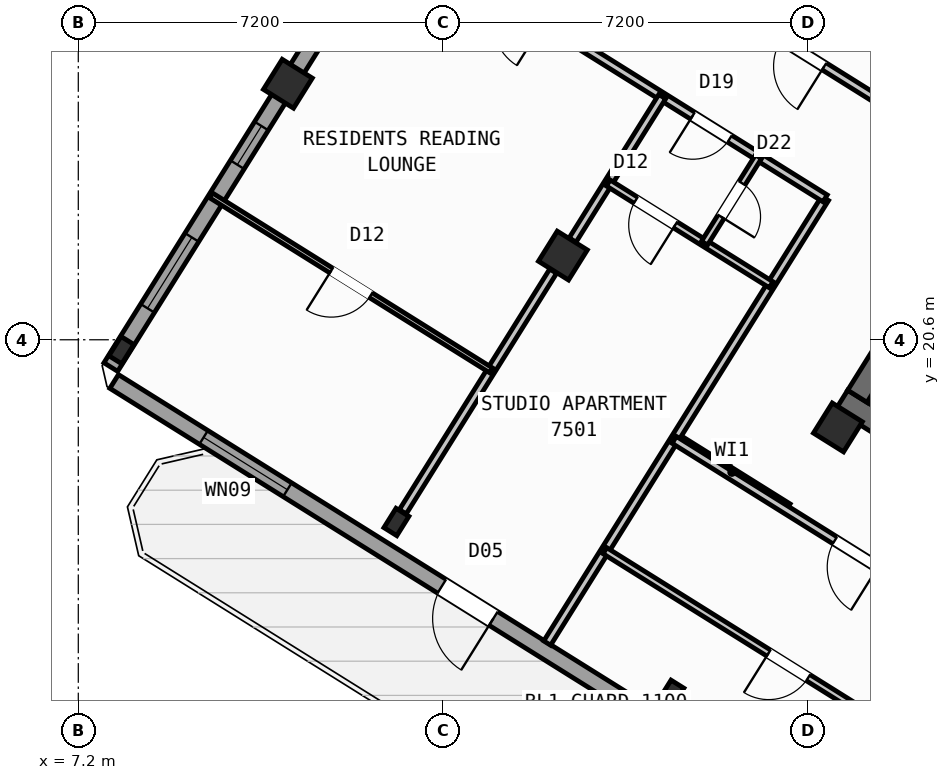
"""IFC4 building model, lengths in metres.
Left out: names, types, materials, properties, quantities, classifications, styles, units other than length and angle.
Written with IfcOpenShell. Run it as: python <this file> out.ifc"""

import sys

from ifc_helpers import new_model, si_unit, direction, frame, frame_2d, origin, origin_2d, place, context, subcontext, project, spatial, rectangle, hollow_rectangle, i_section, extrude, source, transform, mapped, element, fill, save


model = new_model("IFC4")
c1 = context("Model", 3, precision=1e-05, world=origin(), true_north=direction((0.0, 1.0)))
c2 = subcontext(c1, "Body", "Model", "MODEL_VIEW")
j1 = project(units=[si_unit("LENGTHUNIT", "METRE"), si_unit("PLANEANGLEUNIT", "RADIAN")], contexts=[c1])
p1 = place(None, origin())
s1 = spatial("IfcSite", under=j1, at=p1, CompositionType="ELEMENT")
p2 = place(p1, origin())
s2 = spatial("IfcBuilding", under=s1, at=p2, CompositionType="ELEMENT")
p3 = place(p2, frame((0.0, 0.0, 295.2)))
s3 = spatial("IfcBuildingStorey", under=s2, at=p3, CompositionType="ELEMENT", Elevation=295.2)
p4 = place(p3, frame((33.324, 12.503, 0.0), z_axis=(0.0, 0.0, 1.0), x_axis=(-0.848043529849, 0.529926571782, 0.0)))
e1 = element("IfcWall", 1, at=p4, inside=s3, PredefinedType="SHEAR", context=c2, shape_type="SweptSolid", body=[
    extrude(rectangle(XDim=13.04, YDim=0.45, at=frame_2d((6.52, 0.0))), origin(), (0.0, 0.0, 1.0), 3.32),
])
p5 = place(p3, frame((26.007, 24.976, 0.0), z_axis=(0.0, 0.0, 1.0), x_axis=(-0.529931155655, -0.848040665456, 0.0)))
e2 = element("IfcWall", 2, at=p5, inside=s3, PredefinedType="SHEAR", context=c2, shape_type="SweptSolid", body=[
    extrude(rectangle(XDim=6.475, YDim=0.45, at=frame_2d((3.238, 0.0))), origin(), (0.0, 0.0, 1.0), 3.32),
])
m1 = source(origin(), c2, "Body", "SweptSolid", [
    extrude(hollow_rectangle(XDim=0.7, YDim=0.7, WallThickness=0.028, at=origin_2d()), origin(), (0.0, 0.0, 1.0), 3.6),
])
p6 = place(p3, frame((22.191, 18.87, 0.0), z_axis=(0.0, 0.0, 1.0), x_axis=(-0.848048096156, 0.529919264233, 0.0)))
e3 = element("IfcColumn", 3, at=p6, inside=s3, PredefinedType="COLUMN", context=c2, shape_type="MappedRepresentation", body=[
    mapped(m1, transform((0.0, 0.0, 0.0), scale=1.0)),
])
m2 = source(origin(), c2, "Body", "SweptSolid", [
    extrude(i_section(OverallWidth=0.3, OverallDepth=0.45, WebThickness=0.014, FlangeThickness=0.026, at=origin_2d()), origin(), (0.0, 0.0, 1.0), 3.6),
])
p7 = place(p3, frame((18.906, 13.612, 0.0), z_axis=(0.0, 0.0, 1.0), x_axis=(-0.848048096156, 0.529919264233, 0.0)))
e4 = element("IfcColumn", 4, at=p7, inside=s3, PredefinedType="COLUMN", context=c2, shape_type="MappedRepresentation", body=[
    mapped(m2, transform((0.0, 0.0, 0.0), scale=1.0)),
])
p8 = place(p3, frame((16.764, 22.261, 0.0), z_axis=(0.0, 0.0, 1.0), x_axis=(-0.848048096156, 0.529919264233, 0.0)))
e5 = element("IfcColumn", 5, at=p8, inside=s3, PredefinedType="COLUMN", context=c2, shape_type="MappedRepresentation", body=[
    mapped(m1, transform((0.0, 0.0, 0.0), scale=1.0)),
])
p9 = place(p3, frame((13.478, 17.003, 0.0), z_axis=(0.0, 0.0, 1.0), x_axis=(-0.848048096156, 0.529919264233, 0.0)))
e6 = element("IfcColumn", 6, at=p9, inside=s3, PredefinedType="COLUMN", context=c2, shape_type="MappedRepresentation", body=[
    mapped(m2, transform((0.0, 0.0, 0.0), scale=1.0)),
])
p10 = place(p3, frame((11.336, 25.653, 0.0), z_axis=(0.0, 0.0, 1.0), x_axis=(-0.848048096156, 0.529919264233, 0.0)))
e7 = element("IfcColumn", 7, at=p10, inside=s3, PredefinedType="COLUMN", context=c2, shape_type="MappedRepresentation", body=[
    mapped(m1, transform((0.0, 0.0, 0.0), scale=1.0)),
])
p11 = place(p3, frame((8.051, 20.395, 0.0), z_axis=(0.0, 0.0, 1.0), x_axis=(-0.848048096156, 0.529919264233, 0.0)))
e8 = element("IfcColumn", 8, at=p11, inside=s3, PredefinedType="COLUMN", context=c2, shape_type="MappedRepresentation", body=[
    mapped(m2, transform((0.0, 0.0, 0.0), scale=1.0)),
])
p12 = place(p3, frame((29.268, 6.429, 0.0), z_axis=(0.0, 0.0, 1.0), x_axis=(-0.848048398186, 0.529918780885, 0.0)))
e9 = element("IfcWall", 9, at=p12, inside=s3, PredefinedType="STANDARD", context=c2, shape_type="SweptSolid", body=[
    extrude(rectangle(XDim=25.188, YDim=0.32, at=frame_2d((12.594, 0.0))), origin(), (0.0, 0.0, 1.0), 3.32),
])
p13 = place(p12, frame((16.362, 0.0, 0.0)))
e10 = element("IfcOpeningElement", 10, at=p13, cuts=e9, PredefinedType="OPENING", context=c2, shape_type="SweptSolid", body=[
    extrude(rectangle(XDim=1.2, YDim=2.15, at=frame_2d((0.6, 1.075))), frame((0.0, 0.17, 0.0), z_axis=(0.0, -1.0, 0.0), x_axis=(1.0, 0.0, 0.0)), (0.0, 0.0, 1.0), 0.34),
])
p14 = place(p12, frame((3.859, 0.0, 0.9)))
e11 = element("IfcOpeningElement", 11, at=p14, cuts=e9, PredefinedType="OPENING", context=c2, shape_type="SweptSolid", body=[
    extrude(rectangle(XDim=1.65, YDim=1.45, at=frame_2d((0.825, 0.725))), frame((0.0, 0.17, 0.0), z_axis=(0.0, -1.0, 0.0), x_axis=(1.0, 0.0, 0.0)), (0.0, 0.0, 1.0), 0.34),
])
p15 = place(p12, frame((10.519, 0.0, 0.9)))
e12 = element("IfcOpeningElement", 12, at=p15, cuts=e9, PredefinedType="OPENING", context=c2, shape_type="SweptSolid", body=[
    extrude(rectangle(XDim=1.65, YDim=1.45, at=frame_2d((0.825, 0.725))), frame((0.0, 0.17, 0.0), z_axis=(0.0, -1.0, 0.0), x_axis=(1.0, 0.0, 0.0)), (0.0, 0.0, 1.0), 0.34),
])
p16 = place(p12, frame((21.156, 0.0, 0.95)))
e13 = element("IfcOpeningElement", 13, at=p16, cuts=e9, PredefinedType="OPENING", context=c2, shape_type="SweptSolid", body=[
    extrude(rectangle(XDim=1.95, YDim=1.35, at=frame_2d((0.975, 0.675))), frame((0.0, 0.17, 0.0), z_axis=(0.0, -1.0, 0.0), x_axis=(1.0, 0.0, 0.0)), (0.0, 0.0, 1.0), 0.34),
])
p17 = place(p3, frame((7.842, 20.061, 0.0), z_axis=(0.0, 0.0, 1.0), x_axis=(0.529915577903, 0.84805039962, 0.0)))
e14 = element("IfcWall", 14, at=p17, inside=s3, PredefinedType="STANDARD", context=c2, shape_type="SweptSolid", body=[
    extrude(rectangle(XDim=21.587, YDim=0.32, at=frame_2d((10.794, 0.0))), origin(), (0.0, 0.0, 1.0), 3.32),
])
p18 = place(p17, frame((1.368, 0.0, 0.9)))
e15 = element("IfcOpeningElement", 15, at=p18, cuts=e14, PredefinedType="OPENING", context=c2, shape_type="SweptSolid", body=[
    extrude(rectangle(XDim=1.65, YDim=1.45, at=frame_2d((0.825, 0.725))), frame((0.0, 0.17, 0.0), z_axis=(0.0, -1.0, 0.0), x_axis=(1.0, 0.0, 0.0)), (0.0, 0.0, 1.0), 0.34),
])
p19 = place(p17, frame((4.71, 0.0, 1.0)))
e16 = element("IfcOpeningElement", 16, at=p19, cuts=e14, PredefinedType="OPENING", context=c2, shape_type="SweptSolid", body=[
    extrude(rectangle(XDim=0.9, YDim=1.25, at=frame_2d((0.45, 0.625))), frame((0.0, 0.17, 0.0), z_axis=(0.0, -1.0, 0.0), x_axis=(1.0, 0.0, 0.0)), (0.0, 0.0, 1.0), 0.34),
])
p20 = place(p17, frame((7.554, 0.0, 0.95)))
e17 = element("IfcOpeningElement", 17, at=p20, cuts=e14, PredefinedType="OPENING", context=c2, shape_type="SweptSolid", body=[
    extrude(rectangle(XDim=1.95, YDim=1.35, at=frame_2d((0.975, 0.675))), frame((0.0, 0.17, 0.0), z_axis=(0.0, -1.0, 0.0), x_axis=(1.0, 0.0, 0.0)), (0.0, 0.0, 1.0), 0.34),
])
p21 = place(p17, frame((16.744, 0.0, 1.0)))
e18 = element("IfcOpeningElement", 18, at=p21, cuts=e14, PredefinedType="OPENING", context=c2, shape_type="SweptSolid", body=[
    extrude(rectangle(XDim=0.9, YDim=1.25, at=frame_2d((0.45, 0.625))), frame((0.0, 0.17, 0.0), z_axis=(0.0, -1.0, 0.0), x_axis=(1.0, 0.0, 0.0)), (0.0, 0.0, 1.0), 0.34),
])
p22 = place(p17, frame((18.944, 0.0, 1.0)))
e19 = element("IfcOpeningElement", 19, at=p22, cuts=e14, PredefinedType="OPENING", context=c2, shape_type="SweptSolid", body=[
    extrude(rectangle(XDim=0.9, YDim=1.25, at=frame_2d((0.45, 0.625))), frame((0.0, 0.17, 0.0), z_axis=(0.0, -1.0, 0.0), x_axis=(1.0, 0.0, 0.0)), (0.0, 0.0, 1.0), 0.34),
])
p23 = place(p3, frame((19.566, 38.434, 0.0), z_axis=(0.0, 0.0, 1.0), x_axis=(0.84804567626, -0.529923136858, 0.0)))
e20 = element("IfcWall", 20, at=p23, inside=s3, PredefinedType="STANDARD", context=c2, shape_type="SweptSolid", body=[
    extrude(rectangle(XDim=25.188, YDim=0.32, at=frame_2d((12.594, 0.0))), origin(), (0.0, 0.0, 1.0), 3.32),
])
p24 = place(p23, frame((3.55, 0.0, 0.0)))
e21 = element("IfcOpeningElement", 21, at=p24, cuts=e20, PredefinedType="OPENING", context=c2, shape_type="SweptSolid", body=[
    extrude(rectangle(XDim=1.05, YDim=2.15, at=frame_2d((0.525, 1.075))), frame((0.0, 0.17, 0.0), z_axis=(0.0, -1.0, 0.0), x_axis=(1.0, 0.0, 0.0)), (0.0, 0.0, 1.0), 0.34),
])
p25 = place(p23, frame((7.349, 0.0, 0.9)))
e22 = element("IfcOpeningElement", 22, at=p25, cuts=e20, PredefinedType="OPENING", context=c2, shape_type="SweptSolid", body=[
    extrude(rectangle(XDim=1.65, YDim=1.45, at=frame_2d((0.825, 0.725))), frame((0.0, 0.17, 0.0), z_axis=(0.0, -1.0, 0.0), x_axis=(1.0, 0.0, 0.0)), (0.0, 0.0, 1.0), 0.34),
])
p26 = place(p23, frame((10.754, 0.0, 1.0)))
e23 = element("IfcOpeningElement", 23, at=p26, cuts=e20, PredefinedType="OPENING", context=c2, shape_type="SweptSolid", body=[
    extrude(rectangle(XDim=0.9, YDim=1.25, at=frame_2d((0.45, 0.625))), frame((0.0, 0.17, 0.0), z_axis=(0.0, -1.0, 0.0), x_axis=(1.0, 0.0, 0.0)), (0.0, 0.0, 1.0), 0.34),
])
p27 = place(p23, frame((15.169, 0.0, 0.95)))
e24 = element("IfcOpeningElement", 24, at=p27, cuts=e20, PredefinedType="OPENING", context=c2, shape_type="SweptSolid", body=[
    extrude(rectangle(XDim=1.95, YDim=1.35, at=frame_2d((0.975, 0.675))), frame((0.0, 0.17, 0.0), z_axis=(0.0, -1.0, 0.0), x_axis=(1.0, 0.0, 0.0)), (0.0, 0.0, 1.0), 0.34),
])
p28 = place(p23, frame((20.869, 0.0, 0.95)))
e25 = element("IfcOpeningElement", 25, at=p28, cuts=e20, PredefinedType="OPENING", context=c2, shape_type="SweptSolid", body=[
    extrude(rectangle(XDim=1.95, YDim=1.35, at=frame_2d((0.975, 0.675))), frame((0.0, 0.17, 0.0), z_axis=(0.0, -1.0, 0.0), x_axis=(1.0, 0.0, 0.0)), (0.0, 0.0, 1.0), 0.34),
])
p29 = place(p3, frame((21.206, 17.292, 0.0), z_axis=(0.0, 0.0, 1.0), x_axis=(-0.848050851465, 0.529914854792, 0.0)))
e26 = element("IfcWall", 26, at=p29, inside=s3, PredefinedType="PARTITIONING", context=c2, shape_type="SweptSolid", body=[
    extrude(rectangle(XDim=2.61, YDim=0.16, at=frame_2d((1.305, 0.0))), origin(), (0.0, 0.0, 1.0), 3.31),
])
p30 = place(p3, frame((21.938, 23.391, 0.0), z_axis=(0.0, 0.0, 1.0), x_axis=(-0.529924725692, -0.848044683434, 0.0)))
e27 = element("IfcWall", 27, at=p30, inside=s3, PredefinedType="PARTITIONING", context=c2, shape_type="SweptSolid", body=[
    extrude(rectangle(XDim=10.35, YDim=0.16, at=frame_2d((5.175, 0.0))), origin(), (0.0, 0.0, 1.0), 3.31),
])
p31 = place(p3, frame((23.104, 25.256, 0.0), z_axis=(0.0, 0.0, 1.0), x_axis=(-0.848043444964, 0.529926707624, 0.0)))
e28 = element("IfcWall", 28, at=p31, inside=s3, PredefinedType="PARTITIONING", context=c2, shape_type="SweptSolid", body=[
    extrude(rectangle(XDim=10.33, YDim=0.16, at=frame_2d((5.165, 0.0))), origin(), (0.0, 0.0, 1.0), 3.31),
])
p32 = place(p31, frame((1.395, 0.0, 0.0)))
e29 = element("IfcOpeningElement", 29, at=p32, cuts=e28, PredefinedType="OPENING", context=c2, shape_type="SweptSolid", body=[
    extrude(rectangle(XDim=1.0, YDim=2.1, at=frame_2d((0.5, 1.05))), frame((0.0, 0.09, 0.0), z_axis=(0.0, -1.0, 0.0), x_axis=(1.0, 0.0, 0.0)), (0.0, 0.0, 1.0), 0.18),
])
p33 = place(p31, frame((7.904, 0.0, 0.0)))
e30 = element("IfcOpeningElement", 30, at=p33, cuts=e28, PredefinedType="OPENING", context=c2, shape_type="SweptSolid", body=[
    extrude(rectangle(XDim=1.0, YDim=2.1, at=frame_2d((0.5, 1.05))), frame((0.0, 0.09, 0.0), z_axis=(0.0, -1.0, 0.0), x_axis=(1.0, 0.0, 0.0)), (0.0, 0.0, 1.0), 0.18),
])
p34 = place(p3, frame((21.938, 23.391, 0.0), z_axis=(0.0, 0.0, 1.0), x_axis=(-0.848050081784, 0.529916086552, 0.0)))
e31 = element("IfcWall", 31, at=p34, inside=s3, PredefinedType="PARTITIONING", context=c2, shape_type="SweptSolid", body=[
    extrude(rectangle(XDim=10.33, YDim=0.16, at=frame_2d((5.165, 0.0))), origin(), (0.0, 0.0, 1.0), 3.31),
])
p35 = place(p34, frame((2.22, 0.0, 0.0)))
e32 = element("IfcOpeningElement", 32, at=p35, cuts=e31, PredefinedType="OPENING", context=c2, shape_type="SweptSolid", body=[
    extrude(rectangle(XDim=0.86, YDim=2.05, at=frame_2d((0.43, 1.025))), frame((0.0, 0.09, 0.0), z_axis=(0.0, -1.0, 0.0), x_axis=(1.0, 0.0, 0.0)), (0.0, 0.0, 1.0), 0.18),
])
p36 = place(p34, frame((6.55, 0.0, 0.0)))
e33 = element("IfcOpeningElement", 33, at=p36, cuts=e31, PredefinedType="OPENING", context=c2, shape_type="SweptSolid", body=[
    extrude(rectangle(XDim=1.0, YDim=2.1, at=frame_2d((0.5, 1.05))), frame((0.0, 0.09, 0.0), z_axis=(0.0, -1.0, 0.0), x_axis=(1.0, 0.0, 0.0)), (0.0, 0.0, 1.0), 0.18),
])
p37 = place(p3, frame((18.724, 25.399, 0.0), z_axis=(0.0, 0.0, 1.0), x_axis=(-0.529952920244, -0.848027064618, 0.0)))
e34 = element("IfcWall", 34, at=p37, inside=s3, PredefinedType="PARTITIONING", context=c2, shape_type="SweptSolid", body=[
    extrude(rectangle(XDim=3.338, YDim=0.16, at=frame_2d((1.669, 0.0))), origin(), (0.0, 0.0, 1.0), 3.31),
])
p38 = place(p3, frame((16.572, 21.954, 0.0), z_axis=(0.0, 0.0, 1.0), x_axis=(-0.529904903214, -0.848057069748, 0.0)))
e35 = element("IfcWall", 35, at=p38, inside=s3, PredefinedType="PARTITIONING", context=c2, shape_type="SweptSolid", body=[
    extrude(rectangle(XDim=5.601, YDim=0.16, at=frame_2d((2.801, 0.0))), origin(), (0.0, 0.0, 1.0), 3.31),
])
p39 = place(p3, frame((20.873, 21.686, 0.0), z_axis=(0.0, 0.0, 1.0), x_axis=(-0.84803087207, 0.529946827537, 0.0)))
e36 = element("IfcWall", 36, at=p39, inside=s3, PredefinedType="PLUMBINGWALL", context=c2, shape_type="SweptSolid", body=[
    extrude(rectangle(XDim=3.79, YDim=0.14, at=frame_2d((1.895, 0.0))), origin(), (0.0, 0.0, 1.0), 3.31),
])
p40 = place(p39, frame((2.23, 0.0, 0.0)))
e37 = element("IfcOpeningElement", 37, at=p40, cuts=e36, PredefinedType="OPENING", context=c2, shape_type="SweptSolid", body=[
    extrude(rectangle(XDim=0.92, YDim=2.08, at=frame_2d((0.46, 1.04))), frame((0.0, 0.08, 0.0), z_axis=(0.0, -1.0, 0.0), x_axis=(1.0, 0.0, 0.0)), (0.0, 0.0, 1.0), 0.16),
])
p41 = place(p3, frame((20.624, 24.212, 0.0), z_axis=(0.0, 0.0, 1.0), x_axis=(-0.529933431478, -0.848039243315, 0.0)))
e38 = element("IfcWall", 38, at=p41, inside=s3, PredefinedType="PLUMBINGWALL", context=c2, shape_type="SweptSolid", body=[
    extrude(rectangle(XDim=2.01, YDim=0.14, at=frame_2d((1.005, 0.0))), origin(), (0.0, 0.0, 1.0), 3.31),
])
p42 = place(p41, frame((0.615, 0.0, 0.0)))
e39 = element("IfcOpeningElement", 39, at=p42, cuts=e38, PredefinedType="OPENING", context=c2, shape_type="SweptSolid", body=[
    extrude(rectangle(XDim=0.78, YDim=2.05, at=frame_2d((0.39, 1.025))), frame((0.0, 0.08, 0.0), z_axis=(0.0, -1.0, 0.0), x_axis=(1.0, 0.0, 0.0)), (0.0, 0.0, 1.0), 0.16),
])
p43 = place(p3, frame((15.348, 19.995, 0.0), z_axis=(0.0, 0.0, 1.0), x_axis=(-0.848048787466, 0.529918157905, 0.0)))
e40 = element("IfcWall", 40, at=p43, inside=s3, PredefinedType="PARTITIONING", context=c2, shape_type="SweptSolid", body=[
    extrude(rectangle(XDim=6.52, YDim=0.11, at=frame_2d((3.26, 0.0))), origin(), (0.0, 0.0, 1.0), 3.31),
])
p44 = place(p43, frame((2.8, 0.0, 0.0)))
e41 = element("IfcOpeningElement", 41, at=p44, cuts=e40, PredefinedType="OPENING", context=c2, shape_type="SweptSolid", body=[
    extrude(rectangle(XDim=0.92, YDim=2.08, at=frame_2d((0.46, 1.04))), frame((0.0, 0.065, 0.0), z_axis=(0.0, -1.0, 0.0), x_axis=(1.0, 0.0, 0.0)), (0.0, 0.0, 1.0), 0.13),
])
p45 = place(p3, frame((32.164, 10.374, 0.0), z_axis=(0.0, 0.0, 1.0), x_axis=(-0.848044107957, 0.529925646633, 0.0)))
e42 = element("IfcWall", 42, at=p45, inside=s3, PredefinedType="PARTITIONING", context=c2, shape_type="SweptSolid", body=[
    extrude(rectangle(XDim=15.57, YDim=0.16, at=frame_2d((7.785, 0.0))), origin(), (0.0, 0.0, 1.0), 3.31),
])
p46 = place(p45, frame((10.83, 0.0, 0.0)))
e43 = element("IfcOpeningElement", 43, at=p46, cuts=e42, PredefinedType="OPENING", context=c2, shape_type="SweptSolid", body=[
    extrude(rectangle(XDim=1.0, YDim=2.1, at=frame_2d((0.5, 1.05))), frame((0.0, 0.09, 0.0), z_axis=(0.0, -1.0, 0.0), x_axis=(1.0, 0.0, 0.0)), (0.0, 0.0, 1.0), 0.18),
])
p47 = place(p3, frame((29.72, 8.859, 0.0), z_axis=(0.0, 0.0, 1.0), x_axis=(-0.848049134363, 0.529917602752, 0.0)))
e44 = element("IfcWall", 44, at=p47, inside=s3, PredefinedType="PLUMBINGWALL", context=c2, shape_type="SweptSolid", body=[
    extrude(rectangle(XDim=14.3, YDim=0.14, at=frame_2d((7.15, 0.0))), origin(), (0.0, 0.0, 1.0), 3.31),
])
p48 = place(p47, frame((9.57, 0.0, 0.0)))
e45 = element("IfcOpeningElement", 45, at=p48, cuts=e44, PredefinedType="OPENING", context=c2, shape_type="SweptSolid", body=[
    extrude(rectangle(XDim=0.92, YDim=2.08, at=frame_2d((0.46, 1.04))), frame((0.0, 0.08, 0.0), z_axis=(0.0, -1.0, 0.0), x_axis=(1.0, 0.0, 0.0)), (0.0, 0.0, 1.0), 0.16),
])
m3 = source(origin(), c2, "Body", "SweptSolid", [
    extrude(rectangle(XDim=1.2, YDim=2.15, at=frame_2d((0.6, 1.075))), frame((0.0, 0.025, 0.0), z_axis=(0.0, -1.0, 0.0), x_axis=(1.0, 0.0, 0.0)), (0.0, 0.0, 1.0), 0.05),
])
p49 = place(p13, origin())
e46 = element("IfcDoor", 46, at=p49, inside=s3, OperationType="SINGLE_SWING_LEFT", PredefinedType="DOOR", context=c2, shape_type="MappedRepresentation", body=[
    mapped(m3, transform((0.0, 0.0, 0.0), scale=1.0)),
])
fill(e10, e46)
m4 = source(origin(), c2, "Body", "SweptSolid", [
    extrude(rectangle(XDim=1.95, YDim=1.35, at=frame_2d((0.975, 0.675))), frame((0.0, 0.03, 0.0), z_axis=(0.0, -1.0, 0.0), x_axis=(1.0, 0.0, 0.0)), (0.0, 0.0, 1.0), 0.06),
])
p50 = place(p16, origin())
e47 = element("IfcWindow", 47, at=p50, inside=s3, PartitioningType="SINGLE_PANEL", PredefinedType="WINDOW", context=c2, shape_type="MappedRepresentation", body=[
    mapped(m4, transform((0.0, 0.0, 0.0), scale=1.0)),
])
fill(e13, e47)
m5 = source(origin(), c2, "Body", "SweptSolid", [
    extrude(rectangle(XDim=1.65, YDim=1.45, at=frame_2d((0.825, 0.725))), frame((0.0, 0.03, 0.0), z_axis=(0.0, -1.0, 0.0), x_axis=(1.0, 0.0, 0.0)), (0.0, 0.0, 1.0), 0.06),
])
p51 = place(p18, origin())
e48 = element("IfcWindow", 48, at=p51, inside=s3, PartitioningType="SINGLE_PANEL", PredefinedType="WINDOW", context=c2, shape_type="MappedRepresentation", body=[
    mapped(m5, transform((0.0, 0.0, 0.0), scale=1.0)),
])
fill(e15, e48)
m6 = source(origin(), c2, "Body", "SweptSolid", [
    extrude(rectangle(XDim=0.9, YDim=1.25, at=frame_2d((0.45, 0.625))), frame((0.0, 0.03, 0.0), z_axis=(0.0, -1.0, 0.0), x_axis=(1.0, 0.0, 0.0)), (0.0, 0.0, 1.0), 0.06),
])
p52 = place(p19, origin())
e49 = element("IfcWindow", 49, at=p52, inside=s3, PartitioningType="SINGLE_PANEL", PredefinedType="WINDOW", context=c2, shape_type="MappedRepresentation", body=[
    mapped(m6, transform((0.0, 0.0, 0.0), scale=1.0)),
])
fill(e16, e49)
m7 = source(origin(), c2, "Body", "SweptSolid", [
    extrude(rectangle(XDim=0.86, YDim=2.05, at=frame_2d((0.43, 1.025))), frame((0.0, 0.025, 0.0), z_axis=(0.0, -1.0, 0.0), x_axis=(1.0, 0.0, 0.0)), (0.0, 0.0, 1.0), 0.05),
])
p53 = place(p35, origin())
e50 = element("IfcDoor", 50, at=p53, inside=s3, OperationType="SINGLE_SWING_RIGHT", PredefinedType="DOOR", context=c2, shape_type="MappedRepresentation", body=[
    mapped(m7, transform((0.0, 0.0, 0.0), scale=1.0)),
])
fill(e32, e50)
m8 = source(origin(), c2, "Body", "SweptSolid", [
    extrude(rectangle(XDim=0.92, YDim=2.08, at=frame_2d((0.46, 1.04))), frame((0.0, 0.025, 0.0), z_axis=(0.0, -1.0, 0.0), x_axis=(1.0, 0.0, 0.0)), (0.0, 0.0, 1.0), 0.05),
])
p54 = place(p40, origin())
e51 = element("IfcDoor", 51, at=p54, inside=s3, OperationType="SINGLE_SWING_LEFT", PredefinedType="DOOR", context=c2, shape_type="MappedRepresentation", body=[
    mapped(m8, transform((0.0, 0.0, 0.0), scale=1.0)),
])
fill(e37, e51)
m9 = source(origin(), c2, "Body", "SweptSolid", [
    extrude(rectangle(XDim=0.78, YDim=2.05, at=frame_2d((0.39, 1.025))), frame((0.0, 0.025, 0.0), z_axis=(0.0, -1.0, 0.0), x_axis=(1.0, 0.0, 0.0)), (0.0, 0.0, 1.0), 0.05),
])
p55 = place(p42, origin())
e52 = element("IfcDoor", 52, at=p55, inside=s3, OperationType="SINGLE_SWING_RIGHT", PredefinedType="DOOR", context=c2, shape_type="MappedRepresentation", body=[
    mapped(m9, transform((0.0, 0.0, 0.0), scale=1.0)),
])
fill(e39, e52)
p56 = place(p44, origin())
e53 = element("IfcDoor", 53, at=p56, inside=s3, OperationType="SINGLE_SWING_RIGHT", PredefinedType="DOOR", context=c2, shape_type="MappedRepresentation", body=[
    mapped(m8, transform((0.0, 0.0, 0.0), scale=1.0)),
])
fill(e41, e53)
m10 = source(origin(), c2, "Body", "SweptSolid", [
    extrude(rectangle(XDim=1.0, YDim=2.1, at=frame_2d((0.5, 1.05))), frame((0.0, 0.025, 0.0), z_axis=(0.0, -1.0, 0.0), x_axis=(1.0, 0.0, 0.0)), (0.0, 0.0, 1.0), 0.05),
])
p57 = place(p32, origin())
e54 = element("IfcDoor", 54, at=p57, inside=s3, OperationType="SINGLE_SWING_LEFT", PredefinedType="DOOR", context=c2, shape_type="MappedRepresentation", body=[
    mapped(m10, transform((0.0, 0.0, 0.0), scale=1.0)),
])
fill(e29, e54)
p58 = place(p46, origin())
e55 = element("IfcDoor", 55, at=p58, inside=s3, OperationType="SINGLE_SWING_LEFT", PredefinedType="DOOR", context=c2, shape_type="MappedRepresentation", body=[
    mapped(m10, transform((0.0, 0.0, 0.0), scale=1.0)),
])
fill(e43, e55)
p59 = place(p48, origin())
e56 = element("IfcDoor", 56, at=p59, inside=s3, OperationType="SINGLE_SWING_RIGHT", PredefinedType="DOOR", context=c2, shape_type="MappedRepresentation", body=[
    mapped(m8, transform((0.0, 0.0, 0.0), scale=1.0)),
])
fill(e45, e56)
save(model, sys.argv[1])
